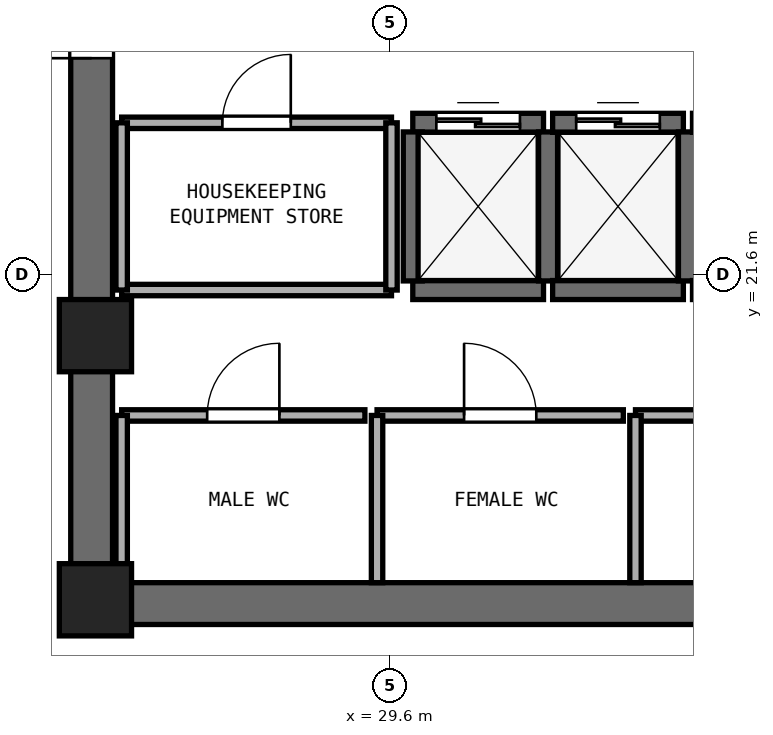
"""IFC4 building model, lengths in metres.
Left out: names, types, materials, properties, quantities, classifications, styles, units other than length and angle.
Written with IfcOpenShell. Run it as: python <this file> out.ifc"""

import sys

from ifc_helpers import new_model, si_unit, direction, frame, frame_2d, origin, origin_2d, place, context, subcontext, project, spatial, rectangle, extrude, element, fill, save


model = new_model("IFC4")
c1 = context("Model", 3, precision=1e-05, world=origin(), true_north=direction((0.0, 1.0)))
c2 = subcontext(c1, "Body", "Model", "MODEL_VIEW")
j1 = project(units=[si_unit("LENGTHUNIT", "METRE"), si_unit("PLANEANGLEUNIT", "RADIAN")], contexts=[c1])
p1 = place(None, origin())
s1 = spatial("IfcSite", under=j1, at=p1, CompositionType="ELEMENT")
p2 = place(p1, origin())
s2 = spatial("IfcBuilding", under=s1, at=p2, CompositionType="ELEMENT")
p3 = place(p2, frame((0.0, 0.0, 189.6)))
s3 = spatial("IfcBuildingStorey", under=s2, at=p3, CompositionType="ELEMENT", Elevation=189.6)
p4 = place(p3, frame((25.4, 17.275, 0.0), z_axis=(0.0, 0.0, 1.0), x_axis=(1.0, 0.0, 0.0)))
e1 = element("IfcWall", 1, at=p4, inside=s3, PredefinedType="SHEAR", context=c2, shape_type="SweptSolid", body=[
    extrude(rectangle(XDim=23.2, YDim=0.55, at=frame_2d((11.6, 0.0))), origin(), (0.0, 0.0, 1.0), 3.54),
])
p5 = place(p3, frame((25.675, 17.55, 0.0), z_axis=(0.0, 0.0, 1.0), x_axis=(0.0, 1.0, 0.0)))
e2 = element("IfcWall", 2, at=p5, inside=s3, PredefinedType="SHEAR", context=c2, shape_type="SweptSolid", body=[
    extrude(rectangle(XDim=15.3, YDim=0.55, at=frame_2d((7.65, 0.0))), origin(), (0.0, 0.0, 1.0), 3.54),
])
p6 = place(p5, frame((6.9, 0.0, 0.0)))
e3 = element("IfcOpeningElement", 3, at=p6, cuts=e2, PredefinedType="OPENING", context=c2, shape_type="SweptSolid", body=[
    extrude(rectangle(XDim=1.5, YDim=2.15, at=frame_2d((0.75, 1.075))), frame((0.0, 0.285, 0.0), z_axis=(0.0, -1.0, 0.0), x_axis=(1.0, 0.0, 0.0)), (0.0, 0.0, 1.0), 0.57),
])
for number, where, z_axis, x_axis in (
    (4, (25.725, 17.325, 0.0), (0.0, 0.0, 1.0), (1.0, 0.0, 0.0)),
    (5, (25.725, 20.8, 0.0), (0.0, 0.0, 1.0), (1.0, 0.0, 0.0)),
):
    element("IfcColumn", number, at=place(p3, frame(where, z_axis=z_axis, x_axis=x_axis)), inside=s3, PredefinedType="PILASTER", context=c2, shape_type="SweptSolid", body=[
        extrude(rectangle(XDim=0.95, YDim=0.95, at=origin_2d()), origin(), (0.0, 0.0, 1.0), 3.8),
    ])
p7 = place(p3, frame((29.9, 21.4, 0.0), z_axis=(0.0, 0.0, 1.0), x_axis=(1.0, 0.0, 0.0)))
e6 = element("IfcWall", 6, at=p7, inside=s3, PredefinedType="SHEAR", context=c2, shape_type="SweptSolid", body=[
    extrude(rectangle(XDim=1.72, YDim=0.25, at=frame_2d((0.86, 0.0))), origin(), (0.0, 0.0, 1.0), 3.54),
])
p8 = place(p3, frame((29.9, 23.6, 0.0), z_axis=(0.0, 0.0, 1.0), x_axis=(1.0, 0.0, 0.0)))
e7 = element("IfcWall", 7, at=p8, inside=s3, PredefinedType="SHEAR", context=c2, shape_type="SweptSolid", body=[
    extrude(rectangle(XDim=1.72, YDim=0.25, at=frame_2d((0.86, 0.0))), origin(), (0.0, 0.0, 1.0), 3.54),
])
p9 = place(p8, frame((0.31, 0.0, 0.0)))
e8 = element("IfcOpeningElement", 8, at=p9, cuts=e7, PredefinedType="OPENING", context=c2, shape_type="SweptSolid", body=[
    extrude(rectangle(XDim=1.1, YDim=2.15, at=frame_2d((0.55, 1.075))), frame((0.0, 0.135, 0.0), z_axis=(0.0, -1.0, 0.0), x_axis=(1.0, 0.0, 0.0)), (0.0, 0.0, 1.0), 0.27),
])
for number, where, z_axis, x_axis in (
    (9, (29.9, 21.52, 0.0), (0.0, 0.0, 1.0), (0.0, 1.0, 0.0)),
    (10, (31.68, 21.52, 0.0), (0.0, 0.0, 1.0), (0.0, 1.0, 0.0)),
):
    element("IfcWall", number, at=place(p3, frame(where, z_axis=z_axis, x_axis=x_axis)), inside=s3, PredefinedType="SHEAR", context=c2, shape_type="SweptSolid", body=[
        extrude(rectangle(XDim=1.96, YDim=0.25, at=frame_2d((0.98, 0.0))), origin(), (0.0, 0.0, 1.0), 3.54),
    ])
p10 = place(p3, frame((31.74, 21.4, 0.0), z_axis=(0.0, 0.0, 1.0), x_axis=(1.0, 0.0, 0.0)))
e11 = element("IfcWall", 11, at=p10, inside=s3, PredefinedType="SHEAR", context=c2, shape_type="SweptSolid", body=[
    extrude(rectangle(XDim=1.72, YDim=0.25, at=frame_2d((0.86, 0.0))), origin(), (0.0, 0.0, 1.0), 3.54),
])
p11 = place(p3, frame((31.74, 23.6, 0.0), z_axis=(0.0, 0.0, 1.0), x_axis=(1.0, 0.0, 0.0)))
e12 = element("IfcWall", 12, at=p11, inside=s3, PredefinedType="SHEAR", context=c2, shape_type="SweptSolid", body=[
    extrude(rectangle(XDim=1.72, YDim=0.25, at=frame_2d((0.86, 0.0))), origin(), (0.0, 0.0, 1.0), 3.54),
])
p12 = place(p11, frame((0.31, 0.0, 0.0)))
e13 = element("IfcOpeningElement", 13, at=p12, cuts=e12, PredefinedType="OPENING", context=c2, shape_type="SweptSolid", body=[
    extrude(rectangle(XDim=1.1, YDim=2.15, at=frame_2d((0.55, 1.075))), frame((0.0, 0.135, 0.0), z_axis=(0.0, -1.0, 0.0), x_axis=(1.0, 0.0, 0.0)), (0.0, 0.0, 1.0), 0.27),
])
p13 = place(p3, frame((33.52, 21.52, 0.0), z_axis=(0.0, 0.0, 1.0), x_axis=(0.0, 1.0, 0.0)))
e14 = element("IfcWall", 14, at=p13, inside=s3, PredefinedType="SHEAR", context=c2, shape_type="SweptSolid", body=[
    extrude(rectangle(XDim=1.96, YDim=0.25, at=frame_2d((0.98, 0.0))), origin(), (0.0, 0.0, 1.0), 3.54),
])
p14 = place(p3, frame((33.58, 21.4, 0.0), z_axis=(0.0, 0.0, 1.0), x_axis=(1.0, 0.0, 0.0)))
e15 = element("IfcWall", 15, at=p14, inside=s3, PredefinedType="SHEAR", context=c2, shape_type="SweptSolid", body=[
    extrude(rectangle(XDim=1.72, YDim=0.25, at=frame_2d((0.86, 0.0))), origin(), (0.0, 0.0, 1.0), 3.54),
])
p15 = place(p3, frame((33.58, 23.6, 0.0), z_axis=(0.0, 0.0, 1.0), x_axis=(1.0, 0.0, 0.0)))
e16 = element("IfcWall", 16, at=p15, inside=s3, PredefinedType="SHEAR", context=c2, shape_type="SweptSolid", body=[
    extrude(rectangle(XDim=1.72, YDim=0.25, at=frame_2d((0.86, 0.0))), origin(), (0.0, 0.0, 1.0), 3.54),
])
p16 = place(p15, frame((0.31, 0.0, 0.0)))
e17 = element("IfcOpeningElement", 17, at=p16, cuts=e16, PredefinedType="OPENING", context=c2, shape_type="SweptSolid", body=[
    extrude(rectangle(XDim=1.1, YDim=2.15, at=frame_2d((0.55, 1.075))), frame((0.0, 0.135, 0.0), z_axis=(0.0, -1.0, 0.0), x_axis=(1.0, 0.0, 0.0)), (0.0, 0.0, 1.0), 0.27),
])
p17 = place(p3, frame((26.07, 19.75, 0.0), z_axis=(0.0, 0.0, 1.0), x_axis=(1.0, 0.0, 0.0)))
e18 = element("IfcWall", 18, at=p17, inside=s3, PredefinedType="PARTITIONING", context=c2, shape_type="SweptSolid", body=[
    extrude(rectangle(XDim=3.2, YDim=0.15, at=frame_2d((1.6, 0.0))), origin(), (0.0, 0.0, 1.0), 3.54),
])
p18 = place(p17, frame((1.125, 0.0, 0.0)))
e19 = element("IfcOpeningElement", 19, at=p18, cuts=e18, PredefinedType="OPENING", context=c2, shape_type="SweptSolid", body=[
    extrude(rectangle(XDim=0.95, YDim=2.1, at=frame_2d((0.475, 1.05))), frame((0.0, 0.085, 0.0), z_axis=(0.0, -1.0, 0.0), x_axis=(1.0, 0.0, 0.0)), (0.0, 0.0, 1.0), 0.17),
])
p19 = place(p3, frame((26.07, 17.55, 0.0), z_axis=(0.0, 0.0, 1.0), x_axis=(0.0, 1.0, 0.0)))
e20 = element("IfcWall", 20, at=p19, inside=s3, PredefinedType="PARTITIONING", context=c2, shape_type="SweptSolid", body=[
    extrude(rectangle(XDim=2.2, YDim=0.15, at=frame_2d((1.1, 0.0))), origin(), (0.0, 0.0, 1.0), 2.64),
])
p20 = place(p3, frame((29.43, 19.75, 0.0), z_axis=(0.0, 0.0, 1.0), x_axis=(1.0, 0.0, 0.0)))
e21 = element("IfcWall", 21, at=p20, inside=s3, PredefinedType="PARTITIONING", context=c2, shape_type="SweptSolid", body=[
    extrude(rectangle(XDim=3.24, YDim=0.15, at=frame_2d((1.62, 0.0))), origin(), (0.0, 0.0, 1.0), 3.54),
])
p21 = place(p20, frame((1.145, 0.0, 0.0)))
e22 = element("IfcOpeningElement", 22, at=p21, cuts=e21, PredefinedType="OPENING", context=c2, shape_type="SweptSolid", body=[
    extrude(rectangle(XDim=0.95, YDim=2.1, at=frame_2d((0.475, 1.05))), frame((0.0, 0.085, 0.0), z_axis=(0.0, -1.0, 0.0), x_axis=(1.0, 0.0, 0.0)), (0.0, 0.0, 1.0), 0.17),
])
p22 = place(p3, frame((29.43, 17.55, 0.0), z_axis=(0.0, 0.0, 1.0), x_axis=(0.0, 1.0, 0.0)))
e23 = element("IfcWall", 23, at=p22, inside=s3, PredefinedType="PARTITIONING", context=c2, shape_type="SweptSolid", body=[
    extrude(rectangle(XDim=2.2, YDim=0.15, at=frame_2d((1.1, 0.0))), origin(), (0.0, 0.0, 1.0), 3.54),
])
p23 = place(p3, frame((32.83, 19.75, 0.0), z_axis=(0.0, 0.0, 1.0), x_axis=(1.0, 0.0, 0.0)))
e24 = element("IfcWall", 24, at=p23, inside=s3, PredefinedType="PARTITIONING", context=c2, shape_type="SweptSolid", body=[
    extrude(rectangle(XDim=4.02, YDim=0.15, at=frame_2d((2.01, 0.0))), origin(), (0.0, 0.0, 1.0), 3.54),
])
p24 = place(p23, frame((1.56, 0.0, 0.0)))
e25 = element("IfcOpeningElement", 25, at=p24, cuts=e24, PredefinedType="OPENING", context=c2, shape_type="SweptSolid", body=[
    extrude(rectangle(XDim=0.9, YDim=2.1, at=frame_2d((0.45, 1.05))), frame((0.0, 0.085, 0.0), z_axis=(0.0, -1.0, 0.0), x_axis=(1.0, 0.0, 0.0)), (0.0, 0.0, 1.0), 0.17),
])
p25 = place(p3, frame((32.83, 17.55, 0.0), z_axis=(0.0, 0.0, 1.0), x_axis=(0.0, 1.0, 0.0)))
e26 = element("IfcWall", 26, at=p25, inside=s3, PredefinedType="PARTITIONING", context=c2, shape_type="SweptSolid", body=[
    extrude(rectangle(XDim=2.2, YDim=0.15, at=frame_2d((1.1, 0.0))), origin(), (0.0, 0.0, 1.0), 3.54),
])
p26 = place(p3, frame((26.07, 21.4, 0.0), z_axis=(0.0, 0.0, 1.0), x_axis=(1.0, 0.0, 0.0)))
e27 = element("IfcWall", 27, at=p26, inside=s3, PredefinedType="PARTITIONING", context=c2, shape_type="SweptSolid", body=[
    extrude(rectangle(XDim=3.55, YDim=0.15, at=frame_2d((1.775, 0.0))), origin(), (0.0, 0.0, 1.0), 3.54),
])
p27 = place(p3, frame((26.07, 23.6, 0.0), z_axis=(0.0, 0.0, 1.0), x_axis=(1.0, 0.0, 0.0)))
e28 = element("IfcWall", 28, at=p27, inside=s3, PredefinedType="PARTITIONING", context=c2, shape_type="SweptSolid", body=[
    extrude(rectangle(XDim=3.55, YDim=0.15, at=frame_2d((1.775, 0.0))), origin(), (0.0, 0.0, 1.0), 3.54),
])
p28 = place(p27, frame((1.325, 0.0, 0.0)))
e29 = element("IfcOpeningElement", 29, at=p28, cuts=e28, PredefinedType="OPENING", context=c2, shape_type="SweptSolid", body=[
    extrude(rectangle(XDim=0.9, YDim=2.1, at=frame_2d((0.45, 1.05))), frame((0.0, 0.085, 0.0), z_axis=(0.0, -1.0, 0.0), x_axis=(1.0, 0.0, 0.0)), (0.0, 0.0, 1.0), 0.17),
])
p29 = place(p3, frame((26.07, 21.4, 0.0), z_axis=(0.0, 0.0, 1.0), x_axis=(0.0, 1.0, 0.0)))
e30 = element("IfcWall", 30, at=p29, inside=s3, PredefinedType="PARTITIONING", context=c2, shape_type="SweptSolid", body=[
    extrude(rectangle(XDim=2.2, YDim=0.15, at=frame_2d((1.1, 0.0))), origin(), (0.0, 0.0, 1.0), 2.64),
])
p30 = place(p3, frame((29.62, 21.4, 0.0), z_axis=(0.0, 0.0, 1.0), x_axis=(0.0, 1.0, 0.0)))
e31 = element("IfcWall", 31, at=p30, inside=s3, PredefinedType="PARTITIONING", context=c2, shape_type="SweptSolid", body=[
    extrude(rectangle(XDim=2.2, YDim=0.15, at=frame_2d((1.1, 0.0))), origin(), (0.0, 0.0, 1.0), 3.54),
])
p31 = place(p9, origin())
e32 = element("IfcDoor", 32, at=p31, inside=s3, OperationType="DOUBLE_DOOR_SLIDING", PredefinedType="DOOR", context=c2, shape_type="SweptSolid", body=[
    extrude(rectangle(XDim=1.1, YDim=2.15, at=frame_2d((0.55, 1.075))), frame((0.0, 0.025, 0.0), z_axis=(0.0, -1.0, 0.0), x_axis=(1.0, 0.0, 0.0)), (0.0, 0.0, 1.0), 0.05),
])
fill(e8, e32)
p32 = place(p12, origin())
e33 = element("IfcDoor", 33, at=p32, inside=s3, OperationType="DOUBLE_DOOR_SLIDING", PredefinedType="DOOR", context=c2, shape_type="SweptSolid", body=[
    extrude(rectangle(XDim=1.1, YDim=2.15, at=frame_2d((0.55, 1.075))), frame((0.0, 0.025, 0.0), z_axis=(0.0, -1.0, 0.0), x_axis=(1.0, 0.0, 0.0)), (0.0, 0.0, 1.0), 0.05),
])
fill(e13, e33)
p33 = place(p6, origin())
e34 = element("IfcDoor", 34, at=p33, inside=s3, OperationType="DOUBLE_DOOR_SINGLE_SWING", PredefinedType="DOOR", context=c2, shape_type="SweptSolid", body=[
    extrude(rectangle(XDim=1.5, YDim=2.15, at=frame_2d((0.75, 1.075))), frame((0.0, 0.025, 0.0), z_axis=(0.0, -1.0, 0.0), x_axis=(1.0, 0.0, 0.0)), (0.0, 0.0, 1.0), 0.05),
])
fill(e3, e34)
p34 = place(p18, origin())
e35 = element("IfcDoor", 35, at=p34, inside=s3, OperationType="SINGLE_SWING_RIGHT", PredefinedType="DOOR", context=c2, shape_type="SweptSolid", body=[
    extrude(rectangle(XDim=0.95, YDim=2.1, at=frame_2d((0.475, 1.05))), frame((0.0, 0.025, 0.0), z_axis=(0.0, -1.0, 0.0), x_axis=(1.0, 0.0, 0.0)), (0.0, 0.0, 1.0), 0.05),
])
fill(e19, e35)
p35 = place(p21, origin())
e36 = element("IfcDoor", 36, at=p35, inside=s3, OperationType="SINGLE_SWING_LEFT", PredefinedType="DOOR", context=c2, shape_type="SweptSolid", body=[
    extrude(rectangle(XDim=0.95, YDim=2.1, at=frame_2d((0.475, 1.05))), frame((0.0, 0.025, 0.0), z_axis=(0.0, -1.0, 0.0), x_axis=(1.0, 0.0, 0.0)), (0.0, 0.0, 1.0), 0.05),
])
fill(e22, e36)
p36 = place(p28, origin())
e37 = element("IfcDoor", 37, at=p36, inside=s3, OperationType="SINGLE_SWING_RIGHT", PredefinedType="DOOR", context=c2, shape_type="SweptSolid", body=[
    extrude(rectangle(XDim=0.9, YDim=2.1, at=frame_2d((0.45, 1.05))), frame((0.0, 0.025, 0.0), z_axis=(0.0, -1.0, 0.0), x_axis=(1.0, 0.0, 0.0)), (0.0, 0.0, 1.0), 0.05),
])
fill(e29, e37)
save(model, sys.argv[1])
